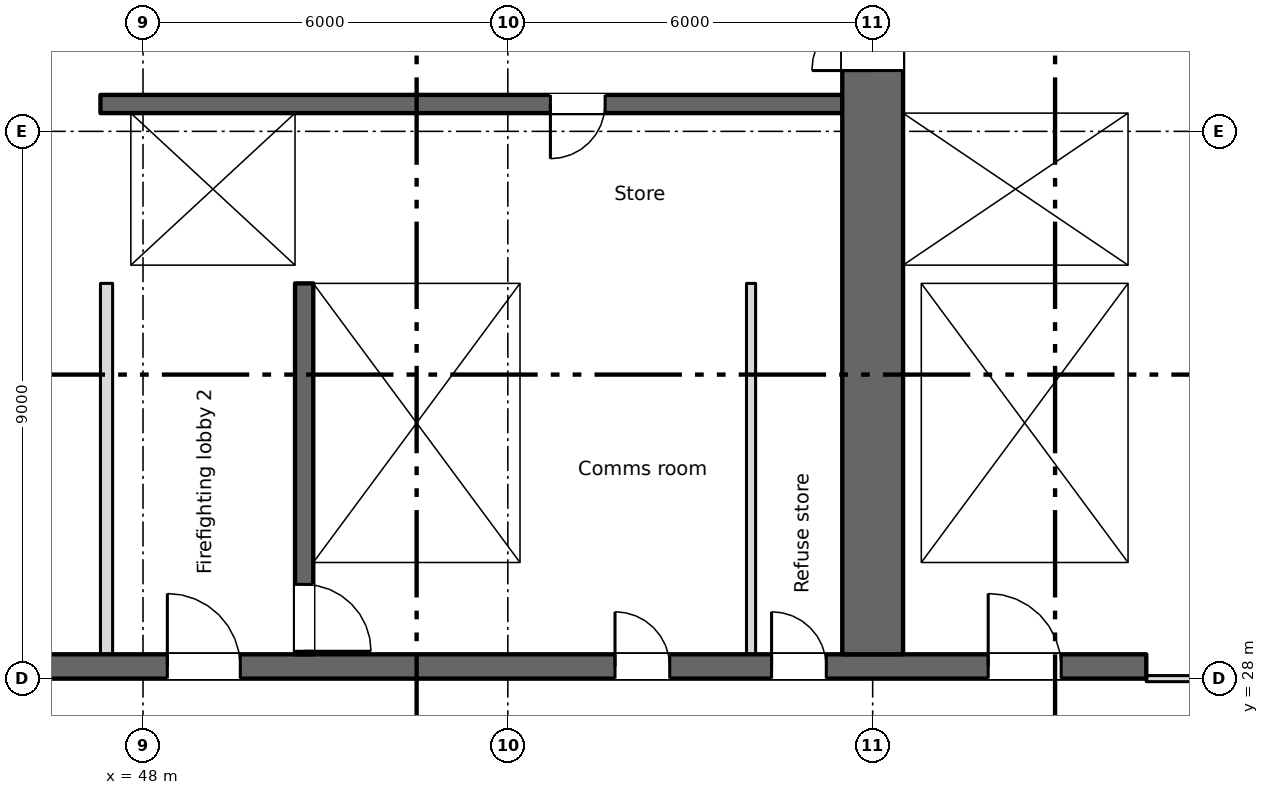
"""IFC4 building model, lengths in metres.
Left out: names, types, materials, properties, quantities, classifications, styles, units other than length and angle.
Written with IfcOpenShell. Run it as: python <this file> out.ifc"""

import sys

from ifc_helpers import new_model, si_unit, direction, frame, frame_2d, origin, place, context, subcontext, project, spatial, rectangle, extrude, element, fill, save


model = new_model("IFC4")
c1 = context("Model", 3, precision=1e-05, world=origin(), true_north=direction((0.0, 1.0)))
c2 = subcontext(c1, "Body", "Model", "MODEL_VIEW")
j1 = project(units=[si_unit("LENGTHUNIT", "METRE"), si_unit("PLANEANGLEUNIT", "RADIAN")], contexts=[c1])
p1 = place(None, origin())
s1 = spatial("IfcSite", under=j1, at=p1, CompositionType="ELEMENT")
p2 = place(p1, origin())
s2 = spatial("IfcBuilding", under=s1, at=p2, CompositionType="ELEMENT")
p3 = place(p2, frame((0.0, 0.0, 75.0)))
s3 = spatial("IfcBuildingStorey", under=s2, at=p3, CompositionType="ELEMENT", Elevation=75.0)
p4 = place(p3, frame((6.7, 28.2, 0.0), z_axis=(0.0, 0.0, 1.0), x_axis=(1.0, 0.0, 0.0)))
e1 = element("IfcWall", 1, at=p4, inside=s3, PredefinedType="SHEAR", context=c2, shape_type="SweptSolid", body=[
    extrude(rectangle(XDim=57.8, YDim=0.4, at=frame_2d((28.9, 0.0))), origin(), (0.0, 0.0, 1.0), 3.35),
])
p5 = place(p4, frame((12.062, 0.0, 0.0)))
e2 = element("IfcOpeningElement", 2, at=p5, cuts=e1, PredefinedType="OPENING", context=c2, shape_type="SweptSolid", body=[
    extrude(rectangle(XDim=0.9, YDim=2.1, at=frame_2d((0.45, 1.05))), frame((0.0, 0.21, 0.0), z_axis=(0.0, -1.0, 0.0), x_axis=(1.0, 0.0, 0.0)), (0.0, 0.0, 1.0), 0.42),
])
p6 = place(p4, frame((14.637, 0.0, 0.0)))
e3 = element("IfcOpeningElement", 3, at=p6, cuts=e1, PredefinedType="OPENING", context=c2, shape_type="SweptSolid", body=[
    extrude(rectangle(XDim=0.9, YDim=2.1, at=frame_2d((0.45, 1.05))), frame((0.0, 0.21, 0.0), z_axis=(0.0, -1.0, 0.0), x_axis=(1.0, 0.0, 0.0)), (0.0, 0.0, 1.0), 0.42),
])
p7 = place(p4, frame((49.062, 0.0, 0.0)))
e4 = element("IfcOpeningElement", 4, at=p7, cuts=e1, PredefinedType="OPENING", context=c2, shape_type="SweptSolid", body=[
    extrude(rectangle(XDim=0.9, YDim=2.1, at=frame_2d((0.45, 1.05))), frame((0.0, 0.21, 0.0), z_axis=(0.0, -1.0, 0.0), x_axis=(1.0, 0.0, 0.0)), (0.0, 0.0, 1.0), 0.42),
])
p8 = place(p4, frame((51.637, 0.0, 0.0)))
e5 = element("IfcOpeningElement", 5, at=p8, cuts=e1, PredefinedType="OPENING", context=c2, shape_type="SweptSolid", body=[
    extrude(rectangle(XDim=0.9, YDim=2.1, at=frame_2d((0.45, 1.05))), frame((0.0, 0.21, 0.0), z_axis=(0.0, -1.0, 0.0), x_axis=(1.0, 0.0, 0.0)), (0.0, 0.0, 1.0), 0.42),
])
p9 = place(p4, frame((1.35, 0.0, 0.0)))
e6 = element("IfcOpeningElement", 6, at=p9, cuts=e1, PredefinedType="OPENING", context=c2, shape_type="SweptSolid", body=[
    extrude(rectangle(XDim=0.9, YDim=2.1, at=frame_2d((0.45, 1.05))), frame((0.0, 0.21, 0.0), z_axis=(0.0, -1.0, 0.0), x_axis=(1.0, 0.0, 0.0)), (0.0, 0.0, 1.0), 0.42),
])
p10 = place(p4, frame((4.7, 0.0, 0.0)))
e7 = element("IfcOpeningElement", 7, at=p10, cuts=e1, PredefinedType="OPENING", context=c2, shape_type="SweptSolid", body=[
    extrude(rectangle(XDim=1.2, YDim=2.1, at=frame_2d((0.6, 1.05))), frame((0.0, 0.21, 0.0), z_axis=(0.0, -1.0, 0.0), x_axis=(1.0, 0.0, 0.0)), (0.0, 0.0, 1.0), 0.42),
])
p11 = place(p4, frame((31.7, 0.0, 0.0)))
e8 = element("IfcOpeningElement", 8, at=p11, cuts=e1, PredefinedType="OPENING", context=c2, shape_type="SweptSolid", body=[
    extrude(rectangle(XDim=1.2, YDim=2.1, at=frame_2d((0.6, 1.05))), frame((0.0, 0.21, 0.0), z_axis=(0.0, -1.0, 0.0), x_axis=(1.0, 0.0, 0.0)), (0.0, 0.0, 1.0), 0.42),
])
p12 = place(p4, frame((55.2, 0.0, 0.0)))
e9 = element("IfcOpeningElement", 9, at=p12, cuts=e1, PredefinedType="OPENING", context=c2, shape_type="SweptSolid", body=[
    extrude(rectangle(XDim=1.2, YDim=2.1, at=frame_2d((0.6, 1.05))), frame((0.0, 0.21, 0.0), z_axis=(0.0, -1.0, 0.0), x_axis=(1.0, 0.0, 0.0)), (0.0, 0.0, 1.0), 0.42),
])
p13 = place(p4, frame((21.7, 0.0, 0.0)))
e10 = element("IfcOpeningElement", 10, at=p13, cuts=e1, PredefinedType="OPENING", context=c2, shape_type="SweptSolid", body=[
    extrude(rectangle(XDim=1.2, YDim=2.1, at=frame_2d((0.6, 1.05))), frame((0.0, 0.21, 0.0), z_axis=(0.0, -1.0, 0.0), x_axis=(1.0, 0.0, 0.0)), (0.0, 0.0, 1.0), 0.42),
])
p14 = place(p4, frame((41.7, 0.0, 0.0)))
e11 = element("IfcOpeningElement", 11, at=p14, cuts=e1, PredefinedType="OPENING", context=c2, shape_type="SweptSolid", body=[
    extrude(rectangle(XDim=1.2, YDim=2.1, at=frame_2d((0.6, 1.05))), frame((0.0, 0.21, 0.0), z_axis=(0.0, -1.0, 0.0), x_axis=(1.0, 0.0, 0.0)), (0.0, 0.0, 1.0), 0.42),
])
p15 = place(p4, frame((24.85, 0.0, 0.0)))
e12 = element("IfcOpeningElement", 12, at=p15, cuts=e1, PredefinedType="OPENING", context=c2, shape_type="SweptSolid", body=[
    extrude(rectangle(XDim=2.4, YDim=2.1, at=frame_2d((1.2, 1.05))), frame((0.0, 0.21, 0.0), z_axis=(0.0, -1.0, 0.0), x_axis=(1.0, 0.0, 0.0)), (0.0, 0.0, 1.0), 0.42),
])
p16 = place(p4, frame((37.35, 0.0, 0.0)))
e13 = element("IfcOpeningElement", 13, at=p16, cuts=e1, PredefinedType="OPENING", context=c2, shape_type="SweptSolid", body=[
    extrude(rectangle(XDim=2.4, YDim=2.1, at=frame_2d((1.2, 1.05))), frame((0.0, 0.21, 0.0), z_axis=(0.0, -1.0, 0.0), x_axis=(1.0, 0.0, 0.0)), (0.0, 0.0, 1.0), 0.42),
])
p17 = place(p4, frame((7.85, 0.0, 0.0)))
e14 = element("IfcOpeningElement", 14, at=p17, cuts=e1, PredefinedType="OPENING", context=c2, shape_type="SweptSolid", body=[
    extrude(rectangle(XDim=2.4, YDim=2.1, at=frame_2d((1.2, 1.05))), frame((0.0, 0.21, 0.0), z_axis=(0.0, -1.0, 0.0), x_axis=(1.0, 0.0, 0.0)), (0.0, 0.0, 1.0), 0.42),
])
p18 = place(p4, frame((28.85, 0.0, 0.0)))
e15 = element("IfcOpeningElement", 15, at=p18, cuts=e1, PredefinedType="OPENING", context=c2, shape_type="SweptSolid", body=[
    extrude(rectangle(XDim=0.9, YDim=2.1, at=frame_2d((0.45, 1.05))), frame((0.0, 0.21, 0.0), z_axis=(0.0, -1.0, 0.0), x_axis=(1.0, 0.0, 0.0)), (0.0, 0.0, 1.0), 0.42),
])
p19 = place(p4, frame((34.85, 0.0, 0.0)))
e16 = element("IfcOpeningElement", 16, at=p19, cuts=e1, PredefinedType="OPENING", context=c2, shape_type="SweptSolid", body=[
    extrude(rectangle(XDim=0.9, YDim=2.1, at=frame_2d((0.45, 1.05))), frame((0.0, 0.21, 0.0), z_axis=(0.0, -1.0, 0.0), x_axis=(1.0, 0.0, 0.0)), (0.0, 0.0, 1.0), 0.42),
])
p20 = place(p3, frame((64.35, 34.8, 0.0), z_axis=(0.0, 0.0, 1.0), x_axis=(0.0, 1.0, 0.0)))
e17 = element("IfcWall", 17, at=p20, inside=s3, PredefinedType="SHEAR", context=c2, shape_type="SweptSolid", body=[
    extrude(rectangle(XDim=10.2, YDim=0.3, at=frame_2d((5.1, 0.0))), origin(), (0.0, 0.0, 1.0), 3.35),
])
p21 = place(p3, frame((60.0, 28.4, 0.0), z_axis=(0.0, 0.0, 1.0), x_axis=(0.0, 1.0, 0.0)))
e18 = element("IfcWall", 18, at=p21, inside=s3, PredefinedType="SHEAR", context=c2, shape_type="SweptSolid", body=[
    extrude(rectangle(XDim=16.6, YDim=1.0, at=frame_2d((8.3, 0.0))), origin(), (0.0, 0.0, 1.0), 3.35),
])
p22 = place(p21, frame((9.6, 0.0, 0.0)))
e19 = element("IfcOpeningElement", 19, at=p22, cuts=e18, PredefinedType="OPENING", context=c2, shape_type="SweptSolid", body=[
    extrude(rectangle(XDim=2.0, YDim=2.1, at=frame_2d((1.0, 1.05))), frame((0.0, 0.51, 0.0), z_axis=(0.0, -1.0, 0.0), x_axis=(1.0, 0.0, 0.0)), (0.0, 0.0, 1.0), 1.02),
])
p23 = place(p21, frame((15.25, 0.0, 0.0)))
e20 = element("IfcOpeningElement", 20, at=p23, cuts=e18, PredefinedType="OPENING", context=c2, shape_type="SweptSolid", body=[
    extrude(rectangle(XDim=1.2, YDim=2.1, at=frame_2d((0.6, 1.05))), frame((0.0, 0.51, 0.0), z_axis=(0.0, -1.0, 0.0), x_axis=(1.0, 0.0, 0.0)), (0.0, 0.0, 1.0), 1.02),
])
p24 = place(p3, frame((50.65, 34.5, 0.0), z_axis=(0.0, 0.0, 1.0), x_axis=(0.0, -1.0, 0.0)))
e21 = element("IfcWall", 21, at=p24, inside=s3, PredefinedType="SHEAR", context=c2, shape_type="SweptSolid", body=[
    extrude(rectangle(XDim=6.1, YDim=0.3, at=frame_2d((3.05, 0.0))), origin(), (0.0, 0.0, 1.0), 3.35),
])
p25 = place(p24, frame((4.95, 0.0, 0.0)))
e22 = element("IfcOpeningElement", 22, at=p25, cuts=e21, PredefinedType="OPENING", context=c2, shape_type="SweptSolid", body=[
    extrude(rectangle(XDim=1.1, YDim=2.1, at=frame_2d((0.55, 1.05))), frame((0.0, 0.16, 0.0), z_axis=(0.0, -1.0, 0.0), x_axis=(1.0, 0.0, 0.0)), (0.0, 0.0, 1.0), 0.32),
])
for number, where, z_axis, x_axis in (
    (23, (54.35, 28.4, 0.0), (0.0, 0.0, 1.0), (0.0, 1.0, 0.0)),
    (24, (60.65, 28.4, 0.0), (0.0, 0.0, 1.0), (0.0, 1.0, 0.0)),
    (25, (64.35, 28.4, 0.0), (0.0, 0.0, 1.0), (0.0, 1.0, 0.0)),
):
    element("IfcWall", number, at=place(p3, frame(where, z_axis=z_axis, x_axis=x_axis)), inside=s3, PredefinedType="SHEAR", context=c2, shape_type="SweptSolid", body=[
        extrude(rectangle(XDim=6.1, YDim=0.3, at=frame_2d((3.05, 0.0))), origin(), (0.0, 0.0, 1.0), 3.35),
    ])
p26 = place(p3, frame((47.3, 34.65, 0.0), z_axis=(0.0, 0.0, 1.0), x_axis=(1.0, 0.0, 0.0)))
e26 = element("IfcWall", 26, at=p26, inside=s3, PredefinedType="SHEAR", context=c2, shape_type="SweptSolid", body=[
    extrude(rectangle(XDim=12.2, YDim=0.3, at=frame_2d((6.1, 0.0))), origin(), (0.0, 0.0, 1.0), 3.35),
])
p27 = place(p26, frame((1.3, 0.0, 0.0)))
e27 = element("IfcOpeningElement", 27, at=p27, cuts=e26, PredefinedType="OPENING", context=c2, shape_type="SweptSolid", body=[
    extrude(rectangle(XDim=1.1, YDim=2.1, at=frame_2d((0.55, 1.05))), frame((0.0, 0.16, 0.0), z_axis=(0.0, -1.0, 0.0), x_axis=(1.0, 0.0, 0.0)), (0.0, 0.0, 1.0), 0.32),
])
p28 = place(p3, frame((60.5, 34.65, 0.0), z_axis=(0.0, 0.0, 1.0), x_axis=(1.0, 0.0, 0.0)))
e28 = element("IfcWall", 28, at=p28, inside=s3, PredefinedType="SHEAR", context=c2, shape_type="SweptSolid", body=[
    extrude(rectangle(XDim=4.0, YDim=0.3, at=frame_2d((2.0, 0.0))), origin(), (0.0, 0.0, 1.0), 3.35),
])
p29 = place(p3, frame((59.5, 37.45, 0.0), z_axis=(0.0, 0.0, 1.0), x_axis=(-1.0, 0.0, 0.0)))
e29 = element("IfcWall", 29, at=p29, inside=s3, PredefinedType="SHEAR", context=c2, shape_type="SweptSolid", body=[
    extrude(rectangle(XDim=12.2, YDim=0.3, at=frame_2d((6.1, 0.0))), origin(), (0.0, 0.0, 1.0), 3.35),
])
p30 = place(p29, frame((3.9, 0.0, 0.0)))
e30 = element("IfcOpeningElement", 30, at=p30, cuts=e29, PredefinedType="OPENING", context=c2, shape_type="SweptSolid", body=[
    extrude(rectangle(XDim=0.9, YDim=2.1, at=frame_2d((0.45, 1.05))), frame((0.0, 0.16, 0.0), z_axis=(0.0, -1.0, 0.0), x_axis=(1.0, 0.0, 0.0)), (0.0, 0.0, 1.0), 0.32),
])
p31 = place(p3, frame((60.5, 37.45, 0.0), z_axis=(0.0, 0.0, 1.0), x_axis=(1.0, 0.0, 0.0)))
e31 = element("IfcWall", 31, at=p31, inside=s3, PredefinedType="SHEAR", context=c2, shape_type="SweptSolid", body=[
    extrude(rectangle(XDim=3.7, YDim=0.3, at=frame_2d((1.85, 0.0))), origin(), (0.0, 0.0, 1.0), 3.35),
])
p32 = place(p31, frame((1.3, 0.0, 0.0)))
e32 = element("IfcOpeningElement", 32, at=p32, cuts=e31, PredefinedType="OPENING", context=c2, shape_type="SweptSolid", body=[
    extrude(rectangle(XDim=1.1, YDim=2.1, at=frame_2d((0.55, 1.05))), frame((0.0, 0.16, 0.0), z_axis=(0.0, -1.0, 0.0), x_axis=(1.0, 0.0, 0.0)), (0.0, 0.0, 1.0), 0.32),
])
p33 = place(p3, frame((47.55, 34.8, 0.0), z_axis=(0.0, 0.0, 1.0), x_axis=(0.0, 1.0, 0.0)))
e33 = element("IfcWall", 33, at=p33, inside=s3, PredefinedType="SHEAR", context=c2, shape_type="SweptSolid", body=[
    extrude(rectangle(XDim=2.5, YDim=0.5, at=frame_2d((1.25, 0.0))), origin(), (0.0, 0.0, 1.0), 3.35),
])
p34 = place(p3, frame((50.65, 34.8, 0.0), z_axis=(0.0, 0.0, 1.0), x_axis=(0.0, 1.0, 0.0)))
e34 = element("IfcWall", 34, at=p34, inside=s3, PredefinedType="SHEAR", context=c2, shape_type="SweptSolid", body=[
    extrude(rectangle(XDim=2.5, YDim=0.3, at=frame_2d((1.25, 0.0))), origin(), (0.0, 0.0, 1.0), 3.35),
])
p35 = place(p3, frame((47.4, 28.4, 0.0), z_axis=(0.0, 0.0, 1.0), x_axis=(0.0, 1.0, 0.0)))
e35 = element("IfcWall", 35, at=p35, inside=s3, PredefinedType="PARTITIONING", context=c2, shape_type="SweptSolid", body=[
    extrude(rectangle(XDim=6.1, YDim=0.2, at=frame_2d((3.05, 0.0))), origin(), (0.0, 0.0, 1.0), 3.35),
])
p36 = place(p3, frame((58.0, 28.4, 0.0), z_axis=(0.0, 0.0, 1.0), x_axis=(0.0, 1.0, 0.0)))
e36 = element("IfcWall", 36, at=p36, inside=s3, PredefinedType="PARTITIONING", context=c2, shape_type="SweptSolid", body=[
    extrude(rectangle(XDim=6.1, YDim=0.15, at=frame_2d((3.05, 0.0))), origin(), (0.0, 0.0, 1.0), 3.35),
])
p37 = place(p3, frame((64.5, 28.0, 0.0), z_axis=(0.0, 0.0, 1.0), x_axis=(1.0, 0.0, 0.0)))
e37 = element("IfcWall", 37, at=p37, inside=s3, PredefinedType="PARTITIONING", context=c2, shape_type="SweptSolid", body=[
    extrude(rectangle(XDim=12.7, YDim=0.1, at=frame_2d((6.35, 0.0))), origin(), (0.0, 0.0, 1.0), 3.35),
])
p38 = place(p37, frame((2.575, 0.0, 0.0)))
e38 = element("IfcOpeningElement", 38, at=p38, cuts=e37, PredefinedType="OPENING", context=c2, shape_type="SweptSolid", body=[
    extrude(rectangle(XDim=1.2, YDim=2.1, at=frame_2d((0.6, 1.05))), frame((0.0, 0.06, 0.0), z_axis=(0.0, -1.0, 0.0), x_axis=(1.0, 0.0, 0.0)), (0.0, 0.0, 1.0), 0.12),
])
p39 = place(p37, frame((8.925, 0.0, 0.0)))
e39 = element("IfcOpeningElement", 39, at=p39, cuts=e37, PredefinedType="OPENING", context=c2, shape_type="SweptSolid", body=[
    extrude(rectangle(XDim=1.2, YDim=2.1, at=frame_2d((0.6, 1.05))), frame((0.0, 0.06, 0.0), z_axis=(0.0, -1.0, 0.0), x_axis=(1.0, 0.0, 0.0)), (0.0, 0.0, 1.0), 0.12),
])
p40 = place(p7, origin())
e40 = element("IfcDoor", 40, at=p40, inside=s3, OperationType="SINGLE_SWING_LEFT", PredefinedType="DOOR", context=c2, shape_type="SweptSolid", body=[
    extrude(rectangle(XDim=0.9, YDim=2.1, at=frame_2d((0.45, 1.05))), frame((0.0, 0.025, 0.0), z_axis=(0.0, -1.0, 0.0), x_axis=(1.0, 0.0, 0.0)), (0.0, 0.0, 1.0), 0.05),
])
fill(e4, e40)
p41 = place(p8, origin())
e41 = element("IfcDoor", 41, at=p41, inside=s3, OperationType="SINGLE_SWING_LEFT", PredefinedType="DOOR", context=c2, shape_type="SweptSolid", body=[
    extrude(rectangle(XDim=0.9, YDim=2.1, at=frame_2d((0.45, 1.05))), frame((0.0, 0.025, 0.0), z_axis=(0.0, -1.0, 0.0), x_axis=(1.0, 0.0, 0.0)), (0.0, 0.0, 1.0), 0.05),
])
fill(e5, e41)
p42 = place(p30, origin())
e42 = element("IfcDoor", 42, at=p42, inside=s3, OperationType="SINGLE_SWING_RIGHT", PredefinedType="DOOR", context=c2, shape_type="SweptSolid", body=[
    extrude(rectangle(XDim=0.9, YDim=2.1, at=frame_2d((0.45, 1.05))), frame((0.0, 0.025, 0.0), z_axis=(0.0, -1.0, 0.0), x_axis=(1.0, 0.0, 0.0)), (0.0, 0.0, 1.0), 0.05),
])
fill(e30, e42)
p43 = place(p32, origin())
e43 = element("IfcDoor", 43, at=p43, inside=s3, OperationType="SLIDING_TO_LEFT", PredefinedType="DOOR", context=c2, shape_type="SweptSolid", body=[
    extrude(rectangle(XDim=1.1, YDim=2.1, at=frame_2d((0.55, 1.05))), frame((0.0, 0.025, 0.0), z_axis=(0.0, -1.0, 0.0), x_axis=(1.0, 0.0, 0.0)), (0.0, 0.0, 1.0), 0.05),
])
fill(e32, e43)
p44 = place(p27, origin())
e44 = element("IfcDoor", 44, at=p44, inside=s3, OperationType="SLIDING_TO_LEFT", PredefinedType="DOOR", context=c2, shape_type="SweptSolid", body=[
    extrude(rectangle(XDim=1.1, YDim=2.1, at=frame_2d((0.55, 1.05))), frame((0.0, 0.025, 0.0), z_axis=(0.0, -1.0, 0.0), x_axis=(1.0, 0.0, 0.0)), (0.0, 0.0, 1.0), 0.05),
])
fill(e27, e44)
p45 = place(p25, origin())
e45 = element("IfcDoor", 45, at=p45, inside=s3, OperationType="SINGLE_SWING_RIGHT", PredefinedType="DOOR", context=c2, shape_type="SweptSolid", body=[
    extrude(rectangle(XDim=1.1, YDim=2.1, at=frame_2d((0.55, 1.05))), frame((0.0, 0.025, 0.0), z_axis=(0.0, -1.0, 0.0), x_axis=(1.0, 0.0, 0.0)), (0.0, 0.0, 1.0), 0.05),
])
fill(e22, e45)
p46 = place(p12, origin())
e46 = element("IfcDoor", 46, at=p46, inside=s3, OperationType="SINGLE_SWING_LEFT", PredefinedType="DOOR", context=c2, shape_type="SweptSolid", body=[
    extrude(rectangle(XDim=1.2, YDim=2.1, at=frame_2d((0.6, 1.05))), frame((0.0, 0.025, 0.0), z_axis=(0.0, -1.0, 0.0), x_axis=(1.0, 0.0, 0.0)), (0.0, 0.0, 1.0), 0.05),
])
fill(e9, e46)
p47 = place(p14, origin())
e47 = element("IfcDoor", 47, at=p47, inside=s3, OperationType="SINGLE_SWING_LEFT", PredefinedType="DOOR", context=c2, shape_type="SweptSolid", body=[
    extrude(rectangle(XDim=1.2, YDim=2.1, at=frame_2d((0.6, 1.05))), frame((0.0, 0.025, 0.0), z_axis=(0.0, -1.0, 0.0), x_axis=(1.0, 0.0, 0.0)), (0.0, 0.0, 1.0), 0.05),
])
fill(e11, e47)
p48 = place(p22, origin())
e48 = element("IfcDoor", 48, at=p48, inside=s3, OperationType="DOUBLE_DOOR_SINGLE_SWING", PredefinedType="DOOR", context=c2, shape_type="SweptSolid", body=[
    extrude(rectangle(XDim=2.0, YDim=2.1, at=frame_2d((1.0, 1.05))), frame((0.0, 0.025, 0.0), z_axis=(0.0, -1.0, 0.0), x_axis=(1.0, 0.0, 0.0)), (0.0, 0.0, 1.0), 0.05),
])
fill(e19, e48)
save(model, sys.argv[1])
